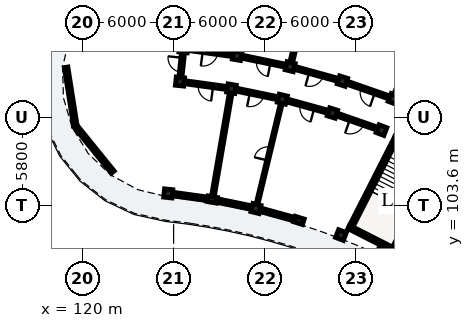
"""IFC4 building model, lengths in metres.
Left out: names, types, materials, properties, quantities, classifications, styles, units other than length and angle.
Written with IfcOpenShell. Run it as: python <this file> out.ifc"""

import sys

from ifc_helpers import new_model, si_unit, direction, frame, frame_2d, origin, origin_2d, place, context, subcontext, project, spatial, rectangle, extrude, element, fill, save


model = new_model("IFC4")
c1 = context("Model", 3, precision=1e-05, world=origin(), true_north=direction((0.0, 1.0)))
c2 = subcontext(c1, "Body", "Model", "MODEL_VIEW")
j1 = project(units=[si_unit("LENGTHUNIT", "METRE"), si_unit("PLANEANGLEUNIT", "RADIAN")], contexts=[c1])
p1 = place(None, origin())
s1 = spatial("IfcSite", under=j1, at=p1, CompositionType="ELEMENT")
p2 = place(p1, origin())
s2 = spatial("IfcBuilding", under=s1, at=p2, CompositionType="ELEMENT")
p3 = place(p2, frame((0.0, 0.0, 22.28)))
s3 = spatial("IfcBuildingStorey", under=s2, at=p3, CompositionType="ELEMENT", Elevation=22.28)
p4 = place(p3, frame((140.684, 108.139, 0.0), z_axis=(0.0, 0.0, 1.0), x_axis=(-0.453992276384, -0.891005618941, 0.0)))
e1 = element("IfcWall", 1, at=p4, inside=s3, PredefinedType="SHEAR", context=c2, shape_type="SweptSolid", body=[
    extrude(rectangle(XDim=6.6, YDim=0.25, at=frame_2d((3.3, 0.0))), origin(), (0.0, 0.0, 1.0), 3.11),
])
p5 = place(p3, frame((137.52, 102.203, 0.0), z_axis=(0.0, 0.0, 1.0), x_axis=(0.891003540237, -0.453996356025, 0.0)))
e2 = element("IfcWall", 2, at=p5, inside=s3, PredefinedType="SHEAR", context=c2, shape_type="SweptSolid", body=[
    extrude(rectangle(XDim=3.42, YDim=0.25, at=frame_2d((1.71, 0.0))), origin(), (0.0, 0.0, 1.0), 3.11),
])
p6 = place(p3, frame((143.509, 106.699, 0.0), z_axis=(0.0, 0.0, 1.0), x_axis=(-0.453992276384, -0.891005618941, 0.0)))
e3 = element("IfcWall", 3, at=p6, inside=s3, PredefinedType="SHEAR", context=c2, shape_type="SweptSolid", body=[
    extrude(rectangle(XDim=6.6, YDim=0.25, at=frame_2d((3.3, 0.0))), origin(), (0.0, 0.0, 1.0), 3.11),
])
p7 = place(p6, frame((0.22, 0.0, 0.0)))
e4 = element("IfcOpeningElement", 4, at=p7, cuts=e3, PredefinedType="OPENING", context=c2, shape_type="SweptSolid", body=[
    extrude(rectangle(XDim=1.05, YDim=2.15, at=frame_2d((0.525, 1.075))), frame((0.0, 0.135, 0.0), z_axis=(0.0, -1.0, 0.0), x_axis=(1.0, 0.0, 0.0)), (0.0, 0.0, 1.0), 0.27),
])
for number, where, z_axis, x_axis in (
    (5, (137.01, 101.667, 0.0), (0.0, 0.0, 1.0), (0.36, 0.933, 0.0)),
    (6, (139.675, 108.57, 0.0), (0.0, 0.0, 1.0), (0.36, 0.933, 0.0)),
    (7, (140.468, 110.622, 0.0), (0.0, 0.0, 1.0), (0.36, 0.933, 0.0)),
):
    element("IfcColumn", number, at=place(p3, frame(where, z_axis=z_axis, x_axis=x_axis)), inside=s3, PredefinedType="COLUMN", context=c2, shape_type="SweptSolid", body=[
        extrude(rectangle(XDim=0.55, YDim=0.55, at=origin_2d()), origin(), (0.0, 0.0, 1.0), 3.11),
    ])
p8 = place(p3, frame((134.243, 102.631, 0.0), z_axis=(0.0, 0.0, 1.0), x_axis=(0.297930225503, 0.954587649581, 0.0)))
e8 = element("IfcColumn", 8, at=p8, inside=s3, PredefinedType="PILASTER", context=c2, shape_type="SweptSolid", body=[
    extrude(rectangle(XDim=0.38, YDim=0.62, at=origin_2d()), origin(), (0.0, 0.0, 1.0), 3.11),
])
for number, where, z_axis, x_axis in (
    (9, (136.448, 109.695, 0.0), (0.0, 0.0, 1.0), (0.298, 0.955, 0.0)),
    (10, (137.103, 111.795, 0.0), (0.0, 0.0, 1.0), (0.298, 0.955, 0.0)),
    (11, (131.418, 103.412, 0.0), (0.0, 0.0, 1.0), (0.234, 0.972, 0.0)),
    (12, (133.153, 110.606, 0.0), (0.0, 0.0, 1.0), (0.234, 0.972, 0.0)),
    (13, (133.669, 112.744, 0.0), (0.0, 0.0, 1.0), (0.234, 0.972, 0.0)),
):
    element("IfcColumn", number, at=place(p3, frame(where, z_axis=z_axis, x_axis=x_axis)), inside=s3, PredefinedType="COLUMN", context=c2, shape_type="SweptSolid", body=[
        extrude(rectangle(XDim=0.55, YDim=0.55, at=origin_2d()), origin(), (0.0, 0.0, 1.0), 3.11),
    ])
p9 = place(p3, frame((128.549, 104.004, 0.0), z_axis=(0.0, 0.0, 1.0), x_axis=(0.169827230012, 0.985473851478, 0.0)))
e14 = element("IfcColumn", 14, at=p9, inside=s3, PredefinedType="PILASTER", context=c2, shape_type="SweptSolid", body=[
    extrude(rectangle(XDim=0.38, YDim=0.62, at=origin_2d()), origin(), (0.0, 0.0, 1.0), 3.11),
])
for number, where, z_axis, x_axis in (
    (15, (129.806, 111.297, 0.0), (0.0, 0.0, 1.0), (0.17, 0.985, 0.0)),
    (16, (130.179, 113.465, 0.0), (0.0, 0.0, 1.0), (0.17, 0.985, 0.0)),
    (17, (125.646, 104.406, 0.0), (0.0, 0.0, 1.0), (0.105, 0.995, 0.0)),
    (18, (126.42, 111.766, 0.0), (0.0, 0.0, 1.0), (0.105, 0.995, 0.0)),
    (19, (126.65, 113.954, 0.0), (0.0, 0.0, 1.0), (0.105, 0.995, 0.0)),
):
    element("IfcColumn", number, at=place(p3, frame(where, z_axis=z_axis, x_axis=x_axis)), inside=s3, PredefinedType="COLUMN", context=c2, shape_type="SweptSolid", body=[
        extrude(rectangle(XDim=0.55, YDim=0.55, at=origin_2d()), origin(), (0.0, 0.0, 1.0), 3.11),
    ])
p10 = place(p3, frame((134.089, 102.674, 0.0), z_axis=(0.0, 0.0, 1.0), x_axis=(-0.963901971286, 0.266257375017, 0.0)))
e20 = element("IfcWall", 20, at=p10, inside=s3, PredefinedType="SOLIDWALL", context=c2, shape_type="SweptSolid", body=[
    extrude(rectangle(XDim=2.525, YDim=0.24, at=frame_2d((1.263, 0.0))), origin(), (0.0, 0.0, 1.0), 2.355),
])
p11 = place(p10, frame((0.542, 0.0, 0.35)))
e21 = element("IfcOpeningElement", 21, at=p11, cuts=e20, PredefinedType="OPENING", context=c2, shape_type="SweptSolid", body=[
    extrude(rectangle(XDim=1.44, YDim=1.66, at=frame_2d((0.72, 0.83))), frame((0.0, 0.13, 0.0), z_axis=(0.0, -1.0, 0.0), x_axis=(1.0, 0.0, 0.0)), (0.0, 0.0, 1.0), 0.26),
])
p12 = place(p3, frame((131.179, 103.461, 0.0), z_axis=(0.0, 0.0, 1.0), x_axis=(-0.979353576928, 0.202154820272, 0.0)))
e22 = element("IfcWall", 22, at=p12, inside=s3, PredefinedType="SOLIDWALL", context=c2, shape_type="SweptSolid", body=[
    extrude(rectangle(XDim=2.525, YDim=0.24, at=frame_2d((1.263, 0.0))), origin(), (0.0, 0.0, 1.0), 2.355),
])
p13 = place(p12, frame((0.483, 0.0, 0.55)))
e23 = element("IfcOpeningElement", 23, at=p13, cuts=e22, PredefinedType="OPENING", context=c2, shape_type="SweptSolid", body=[
    extrude(rectangle(XDim=1.56, YDim=1.51, at=frame_2d((0.78, 0.755))), frame((0.0, 0.13, 0.0), z_axis=(0.0, -1.0, 0.0), x_axis=(1.0, 0.0, 0.0)), (0.0, 0.0, 1.0), 0.26),
])
p14 = place(p3, frame((128.39, 104.026, 0.0), z_axis=(0.0, 0.0, 1.0), x_axis=(-0.990545622952, 0.13718370476, 0.0)))
e24 = element("IfcWall", 24, at=p14, inside=s3, PredefinedType="SOLIDWALL", context=c2, shape_type="SweptSolid", body=[
    extrude(rectangle(XDim=2.525, YDim=0.24, at=frame_2d((1.263, 0.0))), origin(), (0.0, 0.0, 1.0), 2.355),
])
p15 = place(p14, frame((0.423, 0.0, 0.55)))
e25 = element("IfcOpeningElement", 25, at=p15, cuts=e24, PredefinedType="OPENING", context=c2, shape_type="SweptSolid", body=[
    extrude(rectangle(XDim=1.68, YDim=1.585, at=frame_2d((0.84, 0.792))), frame((0.0, 0.13, 0.0), z_axis=(0.0, -1.0, 0.0), x_axis=(1.0, 0.0, 0.0)), (0.0, 0.0, 1.0), 0.26),
])
p16 = place(p3, frame((121.998, 105.807, 0.0), z_axis=(0.0, 0.0, 1.0), x_axis=(-0.629331205321, 0.777137204109, 0.0)))
e26 = element("IfcWall", 26, at=p16, inside=s3, PredefinedType="SOLIDWALL", context=c2, shape_type="SweptSolid", body=[
    extrude(rectangle(XDim=3.908, YDim=0.24, at=frame_2d((1.954, 0.0))), origin(), (0.0, 0.0, 1.0), 2.355),
])
p17 = place(p3, frame((119.538, 108.844, 0.0), z_axis=(0.0, 0.0, 1.0), x_axis=(-0.15648221771, 0.987680776132, 0.0)))
e27 = element("IfcWall", 27, at=p17, inside=s3, PredefinedType="SOLIDWALL", context=c2, shape_type="SweptSolid", body=[
    extrude(rectangle(XDim=3.908, YDim=0.24, at=frame_2d((1.954, 0.0))), origin(), (0.0, 0.0, 1.0), 2.355),
])
p18 = place(p17, frame((1.029, 0.0, 0.4)))
e28 = element("IfcOpeningElement", 28, at=p18, cuts=e27, PredefinedType="OPENING", context=c2, shape_type="SweptSolid", body=[
    extrude(rectangle(XDim=1.85, YDim=1.72, at=frame_2d((0.925, 0.86))), frame((0.0, 0.13, 0.0), z_axis=(0.0, -1.0, 0.0), x_axis=(1.0, 0.0, 0.0)), (0.0, 0.0, 1.0), 0.26),
])
p19 = place(p3, frame((140.612, 110.996, 0.0), z_axis=(0.0, 0.0, 1.0), x_axis=(0.360186633854, 0.932880264982, 0.0)))
e29 = element("IfcWall", 29, at=p19, inside=s3, PredefinedType="PARTITIONING", context=c2, shape_type="SweptSolid", body=[
    extrude(rectangle(XDim=4.7, YDim=0.185, at=frame_2d((2.35, 0.0))), origin(), (0.0, 0.0, 1.0), 2.37),
])
p20 = place(p3, frame((140.137, 110.738, 0.0), z_axis=(0.0, 0.0, 1.0), x_axis=(-0.944253820929, 0.329218349522, 0.0)))
e30 = element("IfcWall", 30, at=p20, inside=s3, PredefinedType="PARTITIONING", context=c2, shape_type="SweptSolid", body=[
    extrude(rectangle(XDim=2.863, YDim=0.205, at=frame_2d((1.432, 0.0))), origin(), (0.0, 0.0, 1.0), 2.37),
])
p21 = place(p20, frame((0.947, 0.0, 0.0)))
e31 = element("IfcOpeningElement", 31, at=p21, cuts=e30, PredefinedType="OPENING", context=c2, shape_type="SweptSolid", body=[
    extrude(rectangle(XDim=0.97, YDim=2.15, at=frame_2d((0.485, 1.075))), frame((0.0, 0.113, 0.0), z_axis=(0.0, -1.0, 0.0), x_axis=(1.0, 0.0, 0.0)), (0.0, 0.0, 1.0), 0.225),
])
p22 = place(p3, frame((139.345, 108.685, 0.0), z_axis=(0.0, 0.0, 1.0), x_axis=(-0.944265123647, 0.329185929627, 0.0)))
e32 = element("IfcWall", 32, at=p22, inside=s3, PredefinedType="PARTITIONING", context=c2, shape_type="SweptSolid", body=[
    extrude(rectangle(XDim=2.718, YDim=0.205, at=frame_2d((1.359, 0.0))), origin(), (0.0, 0.0, 1.0), 2.37),
])
p23 = place(p22, frame((0.874, 0.0, 0.0)))
e33 = element("IfcOpeningElement", 33, at=p23, cuts=e32, PredefinedType="OPENING", context=c2, shape_type="SweptSolid", body=[
    extrude(rectangle(XDim=0.97, YDim=2.15, at=frame_2d((0.485, 1.075))), frame((0.0, 0.113, 0.0), z_axis=(0.0, -1.0, 0.0), x_axis=(1.0, 0.0, 0.0)), (0.0, 0.0, 1.0), 0.225),
])
p24 = place(p3, frame((136.766, 111.889, 0.0), z_axis=(0.0, 0.0, 1.0), x_axis=(-0.963890789093, 0.266297853356, 0.0)))
e34 = element("IfcWall", 34, at=p24, inside=s3, PredefinedType="PARTITIONING", context=c2, shape_type="SweptSolid", body=[
    extrude(rectangle(XDim=2.863, YDim=0.205, at=frame_2d((1.432, 0.0))), origin(), (0.0, 0.0, 1.0), 2.37),
])
p25 = place(p24, frame((0.957, 0.0, 0.0)))
e35 = element("IfcOpeningElement", 35, at=p25, cuts=e34, PredefinedType="OPENING", context=c2, shape_type="SweptSolid", body=[
    extrude(rectangle(XDim=0.95, YDim=2.13, at=frame_2d((0.475, 1.065))), frame((0.0, 0.113, 0.0), z_axis=(0.0, -1.0, 0.0), x_axis=(1.0, 0.0, 0.0)), (0.0, 0.0, 1.0), 0.225),
])
p26 = place(p3, frame((136.11, 109.789, 0.0), z_axis=(0.0, 0.0, 1.0), x_axis=(-0.96388375821, 0.266323301006, 0.0)))
e36 = element("IfcWall", 36, at=p26, inside=s3, PredefinedType="PARTITIONING", context=c2, shape_type="SweptSolid", body=[
    extrude(rectangle(XDim=2.718, YDim=0.205, at=frame_2d((1.359, 0.0))), origin(), (0.0, 0.0, 1.0), 2.37),
])
p27 = place(p26, frame((0.884, 0.0, 0.0)))
e37 = element("IfcOpeningElement", 37, at=p27, cuts=e36, PredefinedType="OPENING", context=c2, shape_type="SweptSolid", body=[
    extrude(rectangle(XDim=0.95, YDim=2.13, at=frame_2d((0.475, 1.065))), frame((0.0, 0.113, 0.0), z_axis=(0.0, -1.0, 0.0), x_axis=(1.0, 0.0, 0.0)), (0.0, 0.0, 1.0), 0.225),
])
p28 = place(p3, frame((133.762, 113.133, 0.0), z_axis=(0.0, 0.0, 1.0), x_axis=(0.234386624934, 0.972143461662, 0.0)))
e38 = element("IfcWall", 38, at=p28, inside=s3, PredefinedType="PARTITIONING", context=c2, shape_type="SweptSolid", body=[
    extrude(rectangle(XDim=4.7, YDim=0.185, at=frame_2d((2.35, 0.0))), origin(), (0.0, 0.0, 1.0), 2.37),
])
p29 = place(p3, frame((131.512, 103.801, 0.0), z_axis=(0.0, 0.0, 1.0), x_axis=(0.234406698576, 0.972138621629, 0.0)))
e39 = element("IfcWall", 39, at=p29, inside=s3, PredefinedType="PARTITIONING", context=c2, shape_type="SweptSolid", body=[
    extrude(rectangle(XDim=6.6, YDim=0.125, at=frame_2d((3.3, 0.0))), origin(), (0.0, 0.0, 1.0), 2.37),
])
p30 = place(p29, frame((2.855, 0.0, 0.0)))
e40 = element("IfcOpeningElement", 40, at=p30, cuts=e39, PredefinedType="OPENING", context=c2, shape_type="SweptSolid", body=[
    extrude(rectangle(XDim=0.89, YDim=2.1, at=frame_2d((0.445, 1.05))), frame((0.0, 0.073, 0.0), z_axis=(0.0, -1.0, 0.0), x_axis=(1.0, 0.0, 0.0)), (0.0, 0.0, 1.0), 0.145),
])
p31 = place(p3, frame((133.326, 112.815, 0.0), z_axis=(0.0, 0.0, 1.0), x_axis=(-0.979348418612, 0.202179808492, 0.0)))
e41 = element("IfcWall", 41, at=p31, inside=s3, PredefinedType="PARTITIONING", context=c2, shape_type="SweptSolid", body=[
    extrude(rectangle(XDim=2.863, YDim=0.205, at=frame_2d((1.432, 0.0))), origin(), (0.0, 0.0, 1.0), 2.37),
])
p32 = place(p31, frame((0.967, 0.0, 0.0)))
e42 = element("IfcOpeningElement", 42, at=p32, cuts=e41, PredefinedType="OPENING", context=c2, shape_type="SweptSolid", body=[
    extrude(rectangle(XDim=0.93, YDim=2.12, at=frame_2d((0.465, 1.06))), frame((0.0, 0.113, 0.0), z_axis=(0.0, -1.0, 0.0), x_axis=(1.0, 0.0, 0.0)), (0.0, 0.0, 1.0), 0.225),
])
p33 = place(p3, frame((132.81, 110.677, 0.0), z_axis=(0.0, 0.0, 1.0), x_axis=(-0.979349423541, 0.202174940608, 0.0)))
e43 = element("IfcWall", 43, at=p33, inside=s3, PredefinedType="PARTITIONING", context=c2, shape_type="SweptSolid", body=[
    extrude(rectangle(XDim=2.718, YDim=0.205, at=frame_2d((1.359, 0.0))), origin(), (0.0, 0.0, 1.0), 2.37),
])
p34 = place(p33, frame((0.894, 0.0, 0.0)))
e44 = element("IfcOpeningElement", 44, at=p34, cuts=e43, PredefinedType="OPENING", context=c2, shape_type="SweptSolid", body=[
    extrude(rectangle(XDim=0.93, YDim=2.12, at=frame_2d((0.465, 1.06))), frame((0.0, 0.113, 0.0), z_axis=(0.0, -1.0, 0.0), x_axis=(1.0, 0.0, 0.0)), (0.0, 0.0, 1.0), 0.225),
])
p35 = place(p3, frame((128.617, 104.398, 0.0), z_axis=(0.0, 0.0, 1.0), x_axis=(0.169825160084, 0.985474208187, 0.0)))
e45 = element("IfcWall", 45, at=p35, inside=s3, PredefinedType="PARTITIONING", context=c2, shape_type="SweptSolid", body=[
    extrude(rectangle(XDim=6.6, YDim=0.185, at=frame_2d((3.3, 0.0))), origin(), (0.0, 0.0, 1.0), 2.37),
])
p36 = place(p3, frame((129.833, 113.513, 0.0), z_axis=(0.0, 0.0, 1.0), x_axis=(-0.990544162976, 0.137194246211, 0.0)))
e46 = element("IfcWall", 46, at=p36, inside=s3, PredefinedType="PARTITIONING", context=c2, shape_type="SweptSolid", body=[
    extrude(rectangle(XDim=2.863, YDim=0.205, at=frame_2d((1.432, 0.0))), origin(), (0.0, 0.0, 1.0), 2.37),
])
p37 = place(p36, frame((0.937, 0.0, 0.0)))
e47 = element("IfcOpeningElement", 47, at=p37, cuts=e46, PredefinedType="OPENING", context=c2, shape_type="SweptSolid", body=[
    extrude(rectangle(XDim=0.99, YDim=2.16, at=frame_2d((0.495, 1.08))), frame((0.0, 0.113, 0.0), z_axis=(0.0, -1.0, 0.0), x_axis=(1.0, 0.0, 0.0)), (0.0, 0.0, 1.0), 0.225),
])
p38 = place(p3, frame((129.459, 111.345, 0.0), z_axis=(0.0, 0.0, 1.0), x_axis=(-0.990535404475, 0.137257467855, 0.0)))
e48 = element("IfcWall", 48, at=p38, inside=s3, PredefinedType="PARTITIONING", context=c2, shape_type="SweptSolid", body=[
    extrude(rectangle(XDim=2.718, YDim=0.205, at=frame_2d((1.359, 0.0))), origin(), (0.0, 0.0, 1.0), 2.37),
])
p39 = place(p38, frame((0.864, 0.0, 0.0)))
e49 = element("IfcOpeningElement", 49, at=p39, cuts=e48, PredefinedType="OPENING", context=c2, shape_type="SweptSolid", body=[
    extrude(rectangle(XDim=0.99, YDim=2.16, at=frame_2d((0.495, 1.08))), frame((0.0, 0.113, 0.0), z_axis=(0.0, -1.0, 0.0), x_axis=(1.0, 0.0, 0.0)), (0.0, 0.0, 1.0), 0.225),
])
p40 = place(p3, frame((126.425, 111.816, 0.0), z_axis=(0.0, 0.0, 1.0), x_axis=(0.104509292252, 0.994523910136, 0.0)))
e50 = element("IfcWall", 50, at=p40, inside=s3, PredefinedType="PARTITIONING", context=c2, shape_type="SweptSolid", body=[
    extrude(rectangle(XDim=2.1, YDim=0.205, at=frame_2d((1.05, 0.0))), origin(), (0.0, 0.0, 1.0), 2.37),
])
p41 = place(p40, frame((0.57, 0.0, 0.0)))
e51 = element("IfcOpeningElement", 51, at=p41, cuts=e50, PredefinedType="OPENING", context=c2, shape_type="SweptSolid", body=[
    extrude(rectangle(XDim=0.95, YDim=2.13, at=frame_2d((0.475, 1.065))), frame((0.0, 0.113, 0.0), z_axis=(0.0, -1.0, 0.0), x_axis=(1.0, 0.0, 0.0)), (0.0, 0.0, 1.0), 0.225),
])
p42 = place(p11, origin())
e52 = element("IfcWindow", 52, at=p42, inside=s3, PartitioningType="SINGLE_PANEL", PredefinedType="WINDOW", context=c2, shape_type="SweptSolid", body=[
    extrude(rectangle(XDim=1.44, YDim=1.66, at=frame_2d((0.72, 0.83))), frame((0.0, 0.03, 0.0), z_axis=(0.0, -1.0, 0.0), x_axis=(1.0, 0.0, 0.0)), (0.0, 0.0, 1.0), 0.06),
])
fill(e21, e52)
p43 = place(p13, origin())
e53 = element("IfcWindow", 53, at=p43, inside=s3, PartitioningType="SINGLE_PANEL", PredefinedType="WINDOW", context=c2, shape_type="SweptSolid", body=[
    extrude(rectangle(XDim=1.56, YDim=1.51, at=frame_2d((0.78, 0.755))), frame((0.0, 0.03, 0.0), z_axis=(0.0, -1.0, 0.0), x_axis=(1.0, 0.0, 0.0)), (0.0, 0.0, 1.0), 0.06),
])
fill(e23, e53)
p44 = place(p15, origin())
e54 = element("IfcWindow", 54, at=p44, inside=s3, PartitioningType="SINGLE_PANEL", PredefinedType="WINDOW", context=c2, shape_type="SweptSolid", body=[
    extrude(rectangle(XDim=1.68, YDim=1.585, at=frame_2d((0.84, 0.792))), frame((0.0, 0.03, 0.0), z_axis=(0.0, -1.0, 0.0), x_axis=(1.0, 0.0, 0.0)), (0.0, 0.0, 1.0), 0.06),
])
fill(e25, e54)
p45 = place(p18, origin())
e55 = element("IfcWindow", 55, at=p45, inside=s3, PartitioningType="SINGLE_PANEL", PredefinedType="WINDOW", context=c2, shape_type="SweptSolid", body=[
    extrude(rectangle(XDim=1.85, YDim=1.72, at=frame_2d((0.925, 0.86))), frame((0.0, 0.03, 0.0), z_axis=(0.0, -1.0, 0.0), x_axis=(1.0, 0.0, 0.0)), (0.0, 0.0, 1.0), 0.06),
])
fill(e28, e55)
p46 = place(p21, origin())
e56 = element("IfcDoor", 56, at=p46, inside=s3, OperationType="SINGLE_SWING_LEFT", PredefinedType="DOOR", context=c2, shape_type="SweptSolid", body=[
    extrude(rectangle(XDim=0.97, YDim=2.15, at=frame_2d((0.485, 1.075))), frame((0.0, 0.025, 0.0), z_axis=(0.0, -1.0, 0.0), x_axis=(1.0, 0.0, 0.0)), (0.0, 0.0, 1.0), 0.05),
])
fill(e31, e56)
p47 = place(p23, origin())
e57 = element("IfcDoor", 57, at=p47, inside=s3, OperationType="SINGLE_SWING_RIGHT", PredefinedType="DOOR", context=c2, shape_type="SweptSolid", body=[
    extrude(rectangle(XDim=0.97, YDim=2.15, at=frame_2d((0.485, 1.075))), frame((0.0, 0.025, 0.0), z_axis=(0.0, -1.0, 0.0), x_axis=(1.0, 0.0, 0.0)), (0.0, 0.0, 1.0), 0.05),
])
fill(e33, e57)
p48 = place(p25, origin())
e58 = element("IfcDoor", 58, at=p48, inside=s3, OperationType="SINGLE_SWING_RIGHT", PredefinedType="DOOR", context=c2, shape_type="SweptSolid", body=[
    extrude(rectangle(XDim=0.95, YDim=2.13, at=frame_2d((0.475, 1.065))), frame((0.0, 0.025, 0.0), z_axis=(0.0, -1.0, 0.0), x_axis=(1.0, 0.0, 0.0)), (0.0, 0.0, 1.0), 0.05),
])
fill(e35, e58)
p49 = place(p27, origin())
e59 = element("IfcDoor", 59, at=p49, inside=s3, OperationType="SINGLE_SWING_LEFT", PredefinedType="DOOR", context=c2, shape_type="SweptSolid", body=[
    extrude(rectangle(XDim=0.95, YDim=2.13, at=frame_2d((0.475, 1.065))), frame((0.0, 0.025, 0.0), z_axis=(0.0, -1.0, 0.0), x_axis=(1.0, 0.0, 0.0)), (0.0, 0.0, 1.0), 0.05),
])
fill(e37, e59)
p50 = place(p30, origin())
e60 = element("IfcDoor", 60, at=p50, inside=s3, OperationType="SINGLE_SWING_LEFT", PredefinedType="DOOR", context=c2, shape_type="SweptSolid", body=[
    extrude(rectangle(XDim=0.89, YDim=2.1, at=frame_2d((0.445, 1.05))), frame((0.0, 0.025, 0.0), z_axis=(0.0, -1.0, 0.0), x_axis=(1.0, 0.0, 0.0)), (0.0, 0.0, 1.0), 0.05),
])
fill(e40, e60)
p51 = place(p32, origin())
e61 = element("IfcDoor", 61, at=p51, inside=s3, OperationType="SINGLE_SWING_LEFT", PredefinedType="DOOR", context=c2, shape_type="SweptSolid", body=[
    extrude(rectangle(XDim=0.93, YDim=2.12, at=frame_2d((0.465, 1.06))), frame((0.0, 0.025, 0.0), z_axis=(0.0, -1.0, 0.0), x_axis=(1.0, 0.0, 0.0)), (0.0, 0.0, 1.0), 0.05),
])
fill(e42, e61)
p52 = place(p34, origin())
e62 = element("IfcDoor", 62, at=p52, inside=s3, OperationType="SINGLE_SWING_RIGHT", PredefinedType="DOOR", context=c2, shape_type="SweptSolid", body=[
    extrude(rectangle(XDim=0.93, YDim=2.12, at=frame_2d((0.465, 1.06))), frame((0.0, 0.025, 0.0), z_axis=(0.0, -1.0, 0.0), x_axis=(1.0, 0.0, 0.0)), (0.0, 0.0, 1.0), 0.05),
])
fill(e44, e62)
p53 = place(p37, origin())
e63 = element("IfcDoor", 63, at=p53, inside=s3, OperationType="SINGLE_SWING_RIGHT", PredefinedType="DOOR", context=c2, shape_type="SweptSolid", body=[
    extrude(rectangle(XDim=0.99, YDim=2.16, at=frame_2d((0.495, 1.08))), frame((0.0, 0.025, 0.0), z_axis=(0.0, -1.0, 0.0), x_axis=(1.0, 0.0, 0.0)), (0.0, 0.0, 1.0), 0.05),
])
fill(e47, e63)
p54 = place(p39, origin())
e64 = element("IfcDoor", 64, at=p54, inside=s3, OperationType="SINGLE_SWING_LEFT", PredefinedType="DOOR", context=c2, shape_type="SweptSolid", body=[
    extrude(rectangle(XDim=0.99, YDim=2.16, at=frame_2d((0.495, 1.08))), frame((0.0, 0.025, 0.0), z_axis=(0.0, -1.0, 0.0), x_axis=(1.0, 0.0, 0.0)), (0.0, 0.0, 1.0), 0.05),
])
fill(e49, e64)
p55 = place(p41, origin())
e65 = element("IfcDoor", 65, at=p55, inside=s3, OperationType="SINGLE_SWING_RIGHT", PredefinedType="DOOR", context=c2, shape_type="SweptSolid", body=[
    extrude(rectangle(XDim=0.95, YDim=2.13, at=frame_2d((0.475, 1.065))), frame((0.0, 0.025, 0.0), z_axis=(0.0, -1.0, 0.0), x_axis=(1.0, 0.0, 0.0)), (0.0, 0.0, 1.0), 0.05),
])
fill(e51, e65)
save(model, sys.argv[1])
